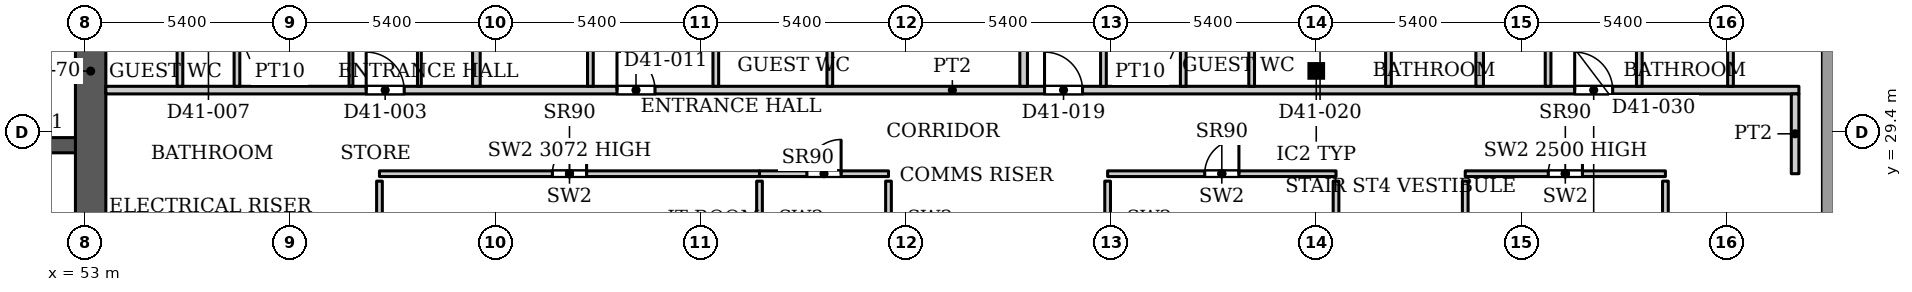
"""IFC4 building model, lengths in metres.
Left out: names, types, materials, properties, quantities, classifications, styles, units other than length and angle.
Written with IfcOpenShell. Run it as: python <this file> out.ifc"""

import sys

from ifc_helpers import new_model, si_unit, direction, frame, frame_2d, origin, origin_2d, place, context, subcontext, project, spatial, rectangle, hollow_rectangle, extrude, source, transform, mapped, element, fill, save


model = new_model("IFC4")
c1 = context("Model", 3, precision=1e-05, world=origin(), true_north=direction((0.0, 1.0)))
c2 = subcontext(c1, "Body", "Model", "MODEL_VIEW")
j1 = project(units=[si_unit("LENGTHUNIT", "METRE"), si_unit("PLANEANGLEUNIT", "RADIAN")], contexts=[c1])
p1 = place(None, origin())
s1 = spatial("IfcSite", under=j1, at=p1, CompositionType="ELEMENT")
p2 = place(p1, origin())
s2 = spatial("IfcBuilding", under=s1, at=p2, CompositionType="ELEMENT")
p3 = place(p2, frame((0.0, 0.0, 176.0)))
s3 = spatial("IfcBuildingStorey", under=s2, at=p3, CompositionType="ELEMENT", Elevation=176.0)
p4 = place(p3, frame((85.4, 31.005, 0.0), z_axis=(0.0, 0.0, 1.0), x_axis=(1.0, 0.0, 0.0)))
e1 = element("IfcColumn", 1, at=p4, inside=s3, PredefinedType="COLUMN", context=c2, shape_type="SweptSolid", body=[
    extrude(hollow_rectangle(XDim=0.305, YDim=0.305, WallThickness=0.016, InnerFilletRadius=0.016, OuterFilletRadius=0.032, at=origin_2d()), origin(), (0.0, 0.0, 1.0), 3.9),
])
p5 = place(p3, frame((34.75, 29.05, 0.0), z_axis=(0.0, 0.0, 1.0), x_axis=(1.0, 0.0, 0.0)))
e2 = element("IfcWall", 2, at=p5, inside=s3, PredefinedType="SHEAR", context=c2, shape_type="SweptSolid", body=[
    extrude(rectangle(XDim=18.4, YDim=0.4, at=frame_2d((9.2, 0.0))), origin(), (0.0, 0.0, 1.0), 3.9),
])
p6 = place(p5, frame((0.875, 0.0, 0.0)))
e3 = element("IfcOpeningElement", 3, at=p6, cuts=e2, PredefinedType="OPENING", context=c2, shape_type="SweptSolid", body=[
    extrude(rectangle(XDim=1.1, YDim=2.2, at=frame_2d((0.55, 1.1))), frame((0.0, 0.21, 0.0), z_axis=(0.0, -1.0, 0.0), x_axis=(1.0, 0.0, 0.0)), (0.0, 0.0, 1.0), 0.42),
])
p7 = place(p5, frame((3.725, 0.0, 0.0)))
e4 = element("IfcOpeningElement", 4, at=p7, cuts=e2, PredefinedType="OPENING", context=c2, shape_type="SweptSolid", body=[
    extrude(rectangle(XDim=1.1, YDim=2.2, at=frame_2d((0.55, 1.1))), frame((0.0, 0.21, 0.0), z_axis=(0.0, -1.0, 0.0), x_axis=(1.0, 0.0, 0.0)), (0.0, 0.0, 1.0), 0.42),
])
p8 = place(p5, frame((6.575, 0.0, 0.0)))
e5 = element("IfcOpeningElement", 5, at=p8, cuts=e2, PredefinedType="OPENING", context=c2, shape_type="SweptSolid", body=[
    extrude(rectangle(XDim=1.1, YDim=2.2, at=frame_2d((0.55, 1.1))), frame((0.0, 0.21, 0.0), z_axis=(0.0, -1.0, 0.0), x_axis=(1.0, 0.0, 0.0)), (0.0, 0.0, 1.0), 0.42),
])
p9 = place(p5, frame((9.425, 0.0, 0.0)))
e6 = element("IfcOpeningElement", 6, at=p9, cuts=e2, PredefinedType="OPENING", context=c2, shape_type="SweptSolid", body=[
    extrude(rectangle(XDim=1.1, YDim=2.2, at=frame_2d((0.55, 1.1))), frame((0.0, 0.21, 0.0), z_axis=(0.0, -1.0, 0.0), x_axis=(1.0, 0.0, 0.0)), (0.0, 0.0, 1.0), 0.42),
])
p10 = place(p5, frame((12.275, 0.0, 0.0)))
e7 = element("IfcOpeningElement", 7, at=p10, cuts=e2, PredefinedType="OPENING", context=c2, shape_type="SweptSolid", body=[
    extrude(rectangle(XDim=1.1, YDim=2.2, at=frame_2d((0.55, 1.1))), frame((0.0, 0.21, 0.0), z_axis=(0.0, -1.0, 0.0), x_axis=(1.0, 0.0, 0.0)), (0.0, 0.0, 1.0), 0.42),
])
p11 = place(p5, frame((15.125, 0.0, 0.0)))
e8 = element("IfcOpeningElement", 8, at=p11, cuts=e2, PredefinedType="OPENING", context=c2, shape_type="SweptSolid", body=[
    extrude(rectangle(XDim=1.1, YDim=2.2, at=frame_2d((0.55, 1.1))), frame((0.0, 0.21, 0.0), z_axis=(0.0, -1.0, 0.0), x_axis=(1.0, 0.0, 0.0)), (0.0, 0.0, 1.0), 0.42),
])
p12 = place(p3, frame((53.15, 25.8, 0.0), z_axis=(0.0, 0.0, 1.0), x_axis=(0.0, 1.0, 0.0)))
e9 = element("IfcWall", 9, at=p12, inside=s3, PredefinedType="SHEAR", context=c2, shape_type="SweptSolid", body=[
    extrude(rectangle(XDim=10.4, YDim=0.8, at=frame_2d((5.2, 0.0))), origin(), (0.0, 0.0, 1.0), 3.9),
])
p13 = place(p3, frame((60.75, 28.3, 0.0), z_axis=(0.0, 0.0, 1.0), x_axis=(1.0, 0.0, 0.0)))
e10 = element("IfcWall", 10, at=p13, inside=s3, PredefinedType="PARTITIONING", context=c2, shape_type="SweptSolid", body=[
    extrude(rectangle(XDim=10.0, YDim=0.15, at=frame_2d((5.0, 0.0))), origin(), (0.0, 0.0, 1.0), 3.072),
])
p14 = place(p13, frame((4.55, 0.0, 0.0)))
e11 = element("IfcOpeningElement", 11, at=p14, cuts=e10, PredefinedType="OPENING", context=c2, shape_type="SweptSolid", body=[
    extrude(rectangle(XDim=0.9, YDim=2.2, at=frame_2d((0.45, 1.1))), frame((0.0, 0.085, 0.0), z_axis=(0.0, -1.0, 0.0), x_axis=(1.0, 0.0, 0.0)), (0.0, 0.0, 1.0), 0.17),
])
p15 = place(p3, frame((60.75, 23.075, 0.0), z_axis=(0.0, 0.0, 1.0), x_axis=(0.0, 1.0, 0.0)))
e12 = element("IfcWall", 12, at=p15, inside=s3, PredefinedType="PARTITIONING", context=c2, shape_type="SweptSolid", body=[
    extrude(rectangle(XDim=5.03, YDim=0.15, at=frame_2d((2.515, 0.0))), origin(), (0.0, 0.0, 1.0), 3.9),
])
p16 = place(p3, frame((70.75, 26.12, 0.0), z_axis=(0.0, 0.0, 1.0), x_axis=(0.0, 1.0, 0.0)))
e13 = element("IfcWall", 13, at=p16, inside=s3, PredefinedType="PARTITIONING", context=c2, shape_type="SweptSolid", body=[
    extrude(rectangle(XDim=1.985, YDim=0.15, at=frame_2d((0.992, 0.0))), origin(), (0.0, 0.0, 1.0), 3.9),
])
p17 = place(p3, frame((70.75, 28.3, 0.0), z_axis=(0.0, 0.0, 1.0), x_axis=(1.0, 0.0, 0.0)))
e14 = element("IfcWall", 14, at=p17, inside=s3, PredefinedType="PARTITIONING", context=c2, shape_type="SweptSolid", body=[
    extrude(rectangle(XDim=3.394, YDim=0.15, at=frame_2d((1.697, 0.0))), origin(), (0.0, 0.0, 1.0), 3.9),
])
p18 = place(p17, frame((1.247, 0.0, 0.0)))
e15 = element("IfcOpeningElement", 15, at=p18, cuts=e14, PredefinedType="OPENING", context=c2, shape_type="SweptSolid", body=[
    extrude(rectangle(XDim=0.9, YDim=2.2, at=frame_2d((0.45, 1.1))), frame((0.0, 0.085, 0.0), z_axis=(0.0, -1.0, 0.0), x_axis=(1.0, 0.0, 0.0)), (0.0, 0.0, 1.0), 0.17),
])
p19 = place(p3, frame((74.144, 26.12, 0.0), z_axis=(0.0, 0.0, 1.0), x_axis=(0.0, 1.0, 0.0)))
e16 = element("IfcWall", 16, at=p19, inside=s3, PredefinedType="PARTITIONING", context=c2, shape_type="SweptSolid", body=[
    extrude(rectangle(XDim=1.985, YDim=0.15, at=frame_2d((0.992, 0.0))), origin(), (0.0, 0.0, 1.0), 3.9),
])
p20 = place(p3, frame((79.91, 28.3, 0.0), z_axis=(0.0, 0.0, 1.0), x_axis=(1.0, 0.0, 0.0)))
e17 = element("IfcWall", 17, at=p20, inside=s3, PredefinedType="PARTITIONING", context=c2, shape_type="SweptSolid", body=[
    extrude(rectangle(XDim=6.01, YDim=0.15, at=frame_2d((3.005, 0.0))), origin(), (0.0, 0.0, 1.0), 3.9),
])
p21 = place(p20, frame((2.555, 0.0, 0.0)))
e18 = element("IfcOpeningElement", 18, at=p21, cuts=e17, PredefinedType="OPENING", context=c2, shape_type="SweptSolid", body=[
    extrude(rectangle(XDim=0.9, YDim=2.2, at=frame_2d((0.45, 1.1))), frame((0.0, 0.085, 0.0), z_axis=(0.0, -1.0, 0.0), x_axis=(1.0, 0.0, 0.0)), (0.0, 0.0, 1.0), 0.17),
])
p22 = place(p3, frame((79.91, 26.12, 0.0), z_axis=(0.0, 0.0, 1.0), x_axis=(0.0, 1.0, 0.0)))
e19 = element("IfcWall", 19, at=p22, inside=s3, PredefinedType="PARTITIONING", context=c2, shape_type="SweptSolid", body=[
    extrude(rectangle(XDim=1.985, YDim=0.15, at=frame_2d((0.992, 0.0))), origin(), (0.0, 0.0, 1.0), 3.9),
])
p23 = place(p3, frame((85.92, 25.62, 0.0), z_axis=(0.0, 0.0, 1.0), x_axis=(0.0, 1.0, 0.0)))
e20 = element("IfcWall", 20, at=p23, inside=s3, PredefinedType="PARTITIONING", context=c2, shape_type="SweptSolid", body=[
    extrude(rectangle(XDim=2.485, YDim=0.15, at=frame_2d((1.242, 0.0))), origin(), (0.0, 0.0, 1.0), 3.9),
])
p24 = place(p3, frame((89.32, 28.3, 0.0), z_axis=(0.0, 0.0, 1.0), x_axis=(1.0, 0.0, 0.0)))
e21 = element("IfcWall", 21, at=p24, inside=s3, PredefinedType="PARTITIONING", context=c2, shape_type="SweptSolid", body=[
    extrude(rectangle(XDim=5.267, YDim=0.15, at=frame_2d((2.633, 0.0))), origin(), (0.0, 0.0, 1.0), 2.5),
])
p25 = place(p24, frame((2.184, 0.0, 0.0)))
e22 = element("IfcOpeningElement", 22, at=p25, cuts=e21, PredefinedType="OPENING", context=c2, shape_type="SweptSolid", body=[
    extrude(rectangle(XDim=0.9, YDim=2.2, at=frame_2d((0.45, 1.1))), frame((0.0, 0.085, 0.0), z_axis=(0.0, -1.0, 0.0), x_axis=(1.0, 0.0, 0.0)), (0.0, 0.0, 1.0), 0.17),
])
p26 = place(p3, frame((89.32, 25.62, 0.0), z_axis=(0.0, 0.0, 1.0), x_axis=(0.0, 1.0, 0.0)))
e23 = element("IfcWall", 23, at=p26, inside=s3, PredefinedType="PARTITIONING", context=c2, shape_type="SweptSolid", body=[
    extrude(rectangle(XDim=2.485, YDim=0.15, at=frame_2d((1.242, 0.0))), origin(), (0.0, 0.0, 1.0), 3.9),
])
p27 = place(p3, frame((94.587, 21.293, 0.0), z_axis=(0.0, 0.0, 1.0), x_axis=(0.0, 1.0, 0.0)))
e24 = element("IfcWall", 24, at=p27, inside=s3, PredefinedType="PARTITIONING", context=c2, shape_type="SweptSolid", body=[
    extrude(rectangle(XDim=6.812, YDim=0.15, at=frame_2d((3.406, 0.0))), origin(), (0.0, 0.0, 1.0), 3.9),
])
p28 = place(p3, frame((53.549, 30.5, 0.0), z_axis=(0.0, 0.0, 1.0), x_axis=(1.0, 0.0, 0.0)))
e25 = element("IfcWall", 25, at=p28, inside=s3, PredefinedType="PARTITIONING", context=c2, shape_type="SweptSolid", body=[
    extrude(rectangle(XDim=44.551, YDim=0.2, at=frame_2d((22.275, 0.0))), origin(), (0.0, 0.0, 1.0), 3.6),
])
p29 = place(p28, frame((6.851, 0.0, 0.0)))
e26 = element("IfcOpeningElement", 26, at=p29, cuts=e25, PredefinedType="OPENING", context=c2, shape_type="SweptSolid", body=[
    extrude(rectangle(XDim=1.0, YDim=2.1, at=frame_2d((0.5, 1.05))), frame((0.0, 0.11, 0.0), z_axis=(0.0, -1.0, 0.0), x_axis=(1.0, 0.0, 0.0)), (0.0, 0.0, 1.0), 0.22),
])
p30 = place(p28, frame((13.451, 0.0, 0.0)))
e27 = element("IfcOpeningElement", 27, at=p30, cuts=e25, PredefinedType="OPENING", context=c2, shape_type="SweptSolid", body=[
    extrude(rectangle(XDim=1.0, YDim=2.1, at=frame_2d((0.5, 1.05))), frame((0.0, 0.11, 0.0), z_axis=(0.0, -1.0, 0.0), x_axis=(1.0, 0.0, 0.0)), (0.0, 0.0, 1.0), 0.22),
])
p31 = place(p28, frame((24.701, 0.0, 0.0)))
e28 = element("IfcOpeningElement", 28, at=p31, cuts=e25, PredefinedType="OPENING", context=c2, shape_type="SweptSolid", body=[
    extrude(rectangle(XDim=1.0, YDim=2.1, at=frame_2d((0.5, 1.05))), frame((0.0, 0.11, 0.0), z_axis=(0.0, -1.0, 0.0), x_axis=(1.0, 0.0, 0.0)), (0.0, 0.0, 1.0), 0.22),
])
p32 = place(p28, frame((38.651, 0.0, 0.0)))
e29 = element("IfcOpeningElement", 29, at=p32, cuts=e25, PredefinedType="OPENING", context=c2, shape_type="SweptSolid", body=[
    extrude(rectangle(XDim=1.0, YDim=2.1, at=frame_2d((0.5, 1.05))), frame((0.0, 0.11, 0.0), z_axis=(0.0, -1.0, 0.0), x_axis=(1.0, 0.0, 0.0)), (0.0, 0.0, 1.0), 0.22),
])
for number, where, z_axis, x_axis in (
    (30, (55.5, 30.6, 0.0), (0.0, 0.0, 1.0), (0.0, 1.0, 0.0)),
    (31, (57.0, 30.6, 0.0), (0.0, 0.0, 1.0), (0.0, 1.0, 0.0)),
):
    element("IfcWall", number, at=place(p3, frame(where, z_axis=z_axis, x_axis=x_axis)), inside=s3, PredefinedType="PARTITIONING", context=c2, shape_type="SweptSolid", body=[
        extrude(rectangle(XDim=3.025, YDim=0.15, at=frame_2d((1.512, 0.0))), origin(), (0.0, 0.0, 1.0), 3.6),
    ])
for number, where, z_axis, x_axis in (
    (32, (60.0, 30.6, 0.0), (0.0, 0.0, 1.0), (0.0, 1.0, 0.0)),
    (33, (61.8, 30.6, 0.0), (0.0, 0.0, 1.0), (0.0, 1.0, 0.0)),
):
    element("IfcWall", number, at=place(p3, frame(where, z_axis=z_axis, x_axis=x_axis)), inside=s3, PredefinedType="PARTITIONING", context=c2, shape_type="SweptSolid", body=[
        extrude(rectangle(XDim=3.025, YDim=0.1, at=frame_2d((1.512, 0.0))), origin(), (0.0, 0.0, 1.0), 3.6),
    ])
p33 = place(p3, frame((63.3, 30.6, 0.0), z_axis=(0.0, 0.0, 1.0), x_axis=(0.0, 1.0, 0.0)))
e34 = element("IfcWall", 34, at=p33, inside=s3, PredefinedType="PARTITIONING", context=c2, shape_type="SweptSolid", body=[
    extrude(rectangle(XDim=13.3, YDim=0.2, at=frame_2d((6.65, 0.0))), origin(), (0.0, 0.0, 1.0), 3.6),
])
p34 = place(p3, frame((66.3, 30.6, 0.0), z_axis=(0.0, 0.0, 1.0), x_axis=(0.0, 1.0, 0.0)))
e35 = element("IfcWall", 35, at=p34, inside=s3, PredefinedType="PARTITIONING", context=c2, shape_type="SweptSolid", body=[
    extrude(rectangle(XDim=3.175, YDim=0.15, at=frame_2d((1.587, 0.0))), origin(), (0.0, 0.0, 1.0), 3.6),
])
for number, where, z_axis, x_axis in (
    (36, (69.6, 30.6, 0.0), (0.0, 0.0, 1.0), (0.0, 1.0, 0.0)),
    (37, (72.6, 30.6, 0.0), (0.0, 0.0, 1.0), (0.0, 1.0, 0.0)),
):
    element("IfcWall", number, at=place(p3, frame(where, z_axis=z_axis, x_axis=x_axis)), inside=s3, PredefinedType="PARTITIONING", context=c2, shape_type="SweptSolid", body=[
        extrude(rectangle(XDim=3.025, YDim=0.15, at=frame_2d((1.512, 0.0))), origin(), (0.0, 0.0, 1.0), 3.6),
    ])
p35 = place(p3, frame((77.7, 30.6, 0.0), z_axis=(0.0, 0.0, 1.0), x_axis=(0.0, 1.0, 0.0)))
e38 = element("IfcWall", 38, at=p35, inside=s3, PredefinedType="PARTITIONING", context=c2, shape_type="SweptSolid", body=[
    extrude(rectangle(XDim=13.3, YDim=0.2, at=frame_2d((6.65, 0.0))), origin(), (0.0, 0.0, 1.0), 3.6),
])
for number, where, z_axis, x_axis in (
    (39, (79.8, 30.6, 0.0), (0.0, 0.0, 1.0), (0.0, 1.0, 0.0)),
    (40, (81.9, 30.6, 0.0), (0.0, 0.0, 1.0), (0.0, 1.0, 0.0)),
    (41, (83.7, 30.6, 0.0), (0.0, 0.0, 1.0), (0.0, 1.0, 0.0)),
    (42, (87.3, 30.6, 0.0), (0.0, 0.0, 1.0), (0.0, 1.0, 0.0)),
):
    element("IfcWall", number, at=place(p3, frame(where, z_axis=z_axis, x_axis=x_axis)), inside=s3, PredefinedType="PARTITIONING", context=c2, shape_type="SweptSolid", body=[
        extrude(rectangle(XDim=3.025, YDim=0.15, at=frame_2d((1.512, 0.0))), origin(), (0.0, 0.0, 1.0), 3.6),
    ])
p36 = place(p3, frame((89.7, 30.6, 0.0), z_axis=(0.0, 0.0, 1.0), x_axis=(0.0, 1.0, 0.0)))
e43 = element("IfcWall", 43, at=p36, inside=s3, PredefinedType="PARTITIONING", context=c2, shape_type="SweptSolid", body=[
    extrude(rectangle(XDim=13.3, YDim=0.2, at=frame_2d((6.65, 0.0))), origin(), (0.0, 0.0, 1.0), 3.6),
])
p37 = place(p3, frame((91.5, 30.6, 0.0), z_axis=(0.0, 0.0, 1.0), x_axis=(0.0, 1.0, 0.0)))
e44 = element("IfcWall", 44, at=p37, inside=s3, PredefinedType="PARTITIONING", context=c2, shape_type="SweptSolid", body=[
    extrude(rectangle(XDim=3.175, YDim=0.15, at=frame_2d((1.587, 0.0))), origin(), (0.0, 0.0, 1.0), 3.6),
])
for number, where, z_axis, x_axis in (
    (45, (93.9, 30.6, 0.0), (0.0, 0.0, 1.0), (0.0, 1.0, 0.0)),
    (46, (96.3, 30.6, 0.0), (0.0, 0.0, 1.0), (0.0, 1.0, 0.0)),
):
    element("IfcWall", number, at=place(p3, frame(where, z_axis=z_axis, x_axis=x_axis)), inside=s3, PredefinedType="PARTITIONING", context=c2, shape_type="SweptSolid", body=[
        extrude(rectangle(XDim=3.025, YDim=0.15, at=frame_2d((1.512, 0.0))), origin(), (0.0, 0.0, 1.0), 3.6),
    ])
p38 = place(p3, frame((98.0, 28.3, 0.0), z_axis=(0.0, 0.0, 1.0), x_axis=(0.0, 1.0, 0.0)))
e47 = element("IfcWall", 47, at=p38, inside=s3, PredefinedType="PARTITIONING", context=c2, shape_type="SweptSolid", body=[
    extrude(rectangle(XDim=2.1, YDim=0.2, at=frame_2d((1.05, 0.0))), origin(), (0.0, 0.0, 1.0), 3.6),
])
m1 = source(origin(), c2, "Body", "SweptSolid", [
    extrude(rectangle(XDim=0.9, YDim=2.2, at=frame_2d((0.45, 1.1))), frame((0.0, 0.025, 0.0), z_axis=(0.0, -1.0, 0.0), x_axis=(1.0, 0.0, 0.0)), (0.0, 0.0, 1.0), 0.05),
])
p39 = place(p14, origin())
e48 = element("IfcDoor", 48, at=p39, inside=s3, OperationType="SINGLE_SWING_LEFT", PredefinedType="DOOR", context=c2, shape_type="MappedRepresentation", body=[
    mapped(m1, transform((0.0, 0.0, 0.0), x_axis=(1.0, 0.0, 0.0), y_axis=(0.0, 1.0, 0.0), z_axis=(0.0, 0.0, 1.0), scale=1.0)),
])
fill(e11, e48)
p40 = place(p18, origin())
e49 = element("IfcDoor", 49, at=p40, inside=s3, OperationType="SINGLE_SWING_LEFT", PredefinedType="DOOR", context=c2, shape_type="MappedRepresentation", body=[
    mapped(m1, transform((0.0, 0.0, 0.0), x_axis=(1.0, 0.0, 0.0), y_axis=(0.0, 1.0, 0.0), z_axis=(0.0, 0.0, 1.0), scale=1.0)),
])
fill(e15, e49)
p41 = place(p21, origin())
e50 = element("IfcDoor", 50, at=p41, inside=s3, OperationType="SINGLE_SWING_LEFT", PredefinedType="DOOR", context=c2, shape_type="MappedRepresentation", body=[
    mapped(m1, transform((0.0, 0.0, 0.0), x_axis=(1.0, 0.0, 0.0), y_axis=(0.0, 1.0, 0.0), z_axis=(0.0, 0.0, 1.0), scale=1.0)),
])
fill(e18, e50)
p42 = place(p25, origin())
e51 = element("IfcDoor", 51, at=p42, inside=s3, OperationType="SINGLE_SWING_LEFT", PredefinedType="DOOR", context=c2, shape_type="MappedRepresentation", body=[
    mapped(m1, transform((0.0, 0.0, 0.0), x_axis=(1.0, 0.0, 0.0), y_axis=(0.0, 1.0, 0.0), z_axis=(0.0, 0.0, 1.0), scale=1.0)),
])
fill(e22, e51)
m2 = source(origin(), c2, "Body", "SweptSolid", [
    extrude(rectangle(XDim=1.0, YDim=2.1, at=frame_2d((0.5, 1.05))), frame((0.0, 0.025, 0.0), z_axis=(0.0, -1.0, 0.0), x_axis=(1.0, 0.0, 0.0)), (0.0, 0.0, 1.0), 0.05),
])
p43 = place(p29, origin())
e52 = element("IfcDoor", 52, at=p43, inside=s3, OperationType="SINGLE_SWING_LEFT", PredefinedType="DOOR", context=c2, shape_type="MappedRepresentation", body=[
    mapped(m2, transform((0.0, 0.0, 0.0), x_axis=(1.0, 0.0, 0.0), y_axis=(0.0, 1.0, 0.0), z_axis=(0.0, 0.0, 1.0), scale=1.0)),
])
fill(e26, e52)
p44 = place(p30, origin())
e53 = element("IfcDoor", 53, at=p44, inside=s3, OperationType="SINGLE_SWING_LEFT", PredefinedType="DOOR", context=c2, shape_type="MappedRepresentation", body=[
    mapped(m2, transform((0.0, 0.0, 0.0), x_axis=(1.0, 0.0, 0.0), y_axis=(0.0, 1.0, 0.0), z_axis=(0.0, 0.0, 1.0), scale=1.0)),
])
fill(e27, e53)
p45 = place(p31, origin())
e54 = element("IfcDoor", 54, at=p45, inside=s3, OperationType="SINGLE_SWING_LEFT", PredefinedType="DOOR", context=c2, shape_type="MappedRepresentation", body=[
    mapped(m2, transform((0.0, 0.0, 0.0), x_axis=(1.0, 0.0, 0.0), y_axis=(0.0, 1.0, 0.0), z_axis=(0.0, 0.0, 1.0), scale=1.0)),
])
fill(e28, e54)
p46 = place(p32, origin())
e55 = element("IfcDoor", 55, at=p46, inside=s3, OperationType="SINGLE_SWING_LEFT", PredefinedType="DOOR", context=c2, shape_type="MappedRepresentation", body=[
    mapped(m2, transform((0.0, 0.0, 0.0), x_axis=(1.0, 0.0, 0.0), y_axis=(0.0, 1.0, 0.0), z_axis=(0.0, 0.0, 1.0), scale=1.0)),
])
fill(e29, e55)
save(model, sys.argv[1])
